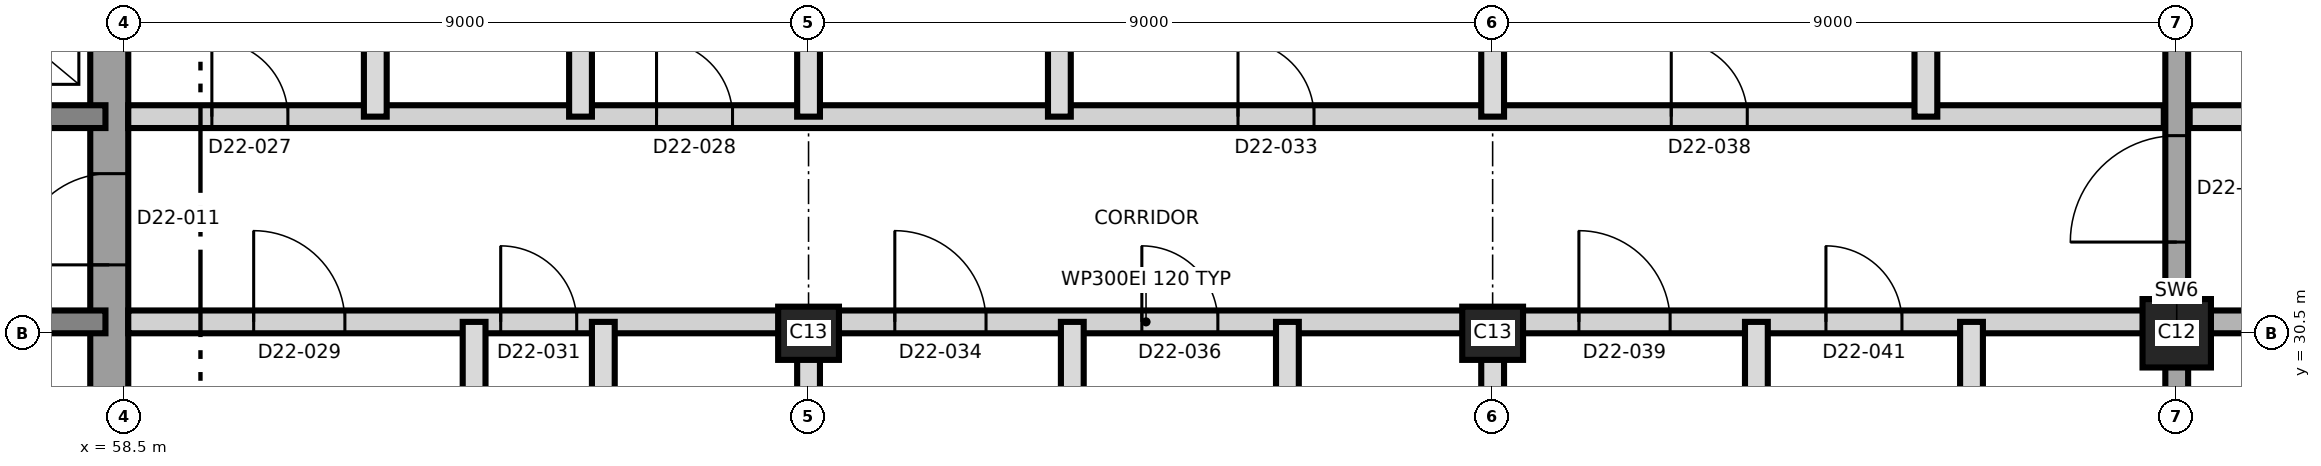
"""IFC4 building model, lengths in metres.
Left out: names, types, materials, properties, quantities, classifications, styles, units other than length and angle.
Written with IfcOpenShell. Run it as: python <this file> out.ifc"""

import sys

from ifc_helpers import new_model, si_unit, direction, frame, frame_2d, origin, origin_2d, place, context, subcontext, project, spatial, rectangle, extrude, element, fill, save


model = new_model("IFC4")
c1 = context("Model", 3, precision=1e-05, world=origin(), true_north=direction((0.0, 1.0)))
c2 = subcontext(c1, "Body", "Model", "MODEL_VIEW")
j1 = project(units=[si_unit("LENGTHUNIT", "METRE"), si_unit("PLANEANGLEUNIT", "RADIAN")], contexts=[c1])
p1 = place(None, origin())
s1 = spatial("IfcSite", under=j1, at=p1, CompositionType="ELEMENT")
p2 = place(p1, origin())
s2 = spatial("IfcBuilding", under=s1, at=p2, CompositionType="ELEMENT")
p3 = place(p2, frame((0.0, 0.0, 203.2)))
s3 = spatial("IfcBuildingStorey", under=s2, at=p3, CompositionType="ELEMENT", Elevation=203.2)
p4 = place(p3, frame((58.3, 21.25, 0.0), z_axis=(0.0, 0.0, 1.0), x_axis=(0.0, 1.0, 0.0)))
e1 = element("IfcWall", 1, at=p4, inside=s3, PredefinedType="SHEAR", context=c2, shape_type="SweptSolid", body=[
    extrude(rectangle(XDim=18.5, YDim=0.5, at=frame_2d((9.25, 0.0))), origin(), (0.0, 0.0, 1.0), 3.7),
])
p5 = place(p4, frame((10.15, 0.0, 0.0)))
e2 = element("IfcOpeningElement", 2, at=p5, cuts=e1, PredefinedType="OPENING", context=c2, shape_type="SweptSolid", body=[
    extrude(rectangle(XDim=1.2, YDim=2.1, at=frame_2d((0.6, 1.05))), frame((0.0, 0.26, 0.0), z_axis=(0.0, -1.0, 0.0), x_axis=(1.0, 0.0, 0.0)), (0.0, 0.0, 1.0), 0.52),
])
p6 = place(p3, frame((31.75, 30.65, 0.0), z_axis=(0.0, 0.0, 1.0), x_axis=(1.0, 0.0, 0.0)))
e3 = element("IfcWall", 3, at=p6, inside=s3, PredefinedType="SHEAR", context=c2, shape_type="SweptSolid", body=[
    extrude(rectangle(XDim=26.5, YDim=0.3, at=frame_2d((13.25, 0.0))), origin(), (0.0, 0.0, 1.0), 3.7),
])
p7 = place(p6, frame((24.75, 0.0, 0.0)))
e4 = element("IfcOpeningElement", 4, at=p7, cuts=e3, PredefinedType="OPENING", context=c2, shape_type="SweptSolid", body=[
    extrude(rectangle(XDim=1.0, YDim=2.1, at=frame_2d((0.5, 1.05))), frame((0.0, 0.16, 0.0), z_axis=(0.0, -1.0, 0.0), x_axis=(1.0, 0.0, 0.0)), (0.0, 0.0, 1.0), 0.32),
])
p8 = place(p6, frame((4.05, 0.0, 0.0)))
e5 = element("IfcOpeningElement", 5, at=p8, cuts=e3, PredefinedType="OPENING", context=c2, shape_type="SweptSolid", body=[
    extrude(rectangle(XDim=1.0, YDim=2.1, at=frame_2d((0.5, 1.05))), frame((0.0, 0.16, 0.0), z_axis=(0.0, -1.0, 0.0), x_axis=(1.0, 0.0, 0.0)), (0.0, 0.0, 1.0), 0.32),
])
p9 = place(p3, frame((31.75, 33.35, 0.0), z_axis=(0.0, 0.0, 1.0), x_axis=(1.0, 0.0, 0.0)))
e6 = element("IfcWall", 6, at=p9, inside=s3, PredefinedType="SHEAR", context=c2, shape_type="SweptSolid", body=[
    extrude(rectangle(XDim=26.5, YDim=0.3, at=frame_2d((13.25, 0.0))), origin(), (0.0, 0.0, 1.0), 3.7),
])
p10 = place(p9, frame((13.9, 0.0, 0.0)))
e7 = element("IfcOpeningElement", 7, at=p10, cuts=e6, PredefinedType="OPENING", context=c2, shape_type="SweptSolid", body=[
    extrude(rectangle(XDim=1.4, YDim=2.1, at=frame_2d((0.7, 1.05))), frame((0.0, 0.16, 0.0), z_axis=(0.0, -1.0, 0.0), x_axis=(1.0, 0.0, 0.0)), (0.0, 0.0, 1.0), 0.32),
])
p11 = place(p9, frame((5.375, 0.0, 0.0)))
e8 = element("IfcOpeningElement", 8, at=p11, cuts=e6, PredefinedType="OPENING", context=c2, shape_type="SweptSolid", body=[
    extrude(rectangle(XDim=1.2, YDim=2.1, at=frame_2d((0.6, 1.05))), frame((0.0, 0.16, 0.0), z_axis=(0.0, -1.0, 0.0), x_axis=(1.0, 0.0, 0.0)), (0.0, 0.0, 1.0), 0.32),
])
p12 = place(p9, frame((19.925, 0.0, 0.0)))
e9 = element("IfcOpeningElement", 9, at=p12, cuts=e6, PredefinedType="OPENING", context=c2, shape_type="SweptSolid", body=[
    extrude(rectangle(XDim=1.2, YDim=2.1, at=frame_2d((0.6, 1.05))), frame((0.0, 0.16, 0.0), z_axis=(0.0, -1.0, 0.0), x_axis=(1.0, 0.0, 0.0)), (0.0, 0.0, 1.0), 0.32),
])
for number, where, z_axis, x_axis in (
    (10, (67.5, 30.5, 0.0), (0.0, 0.0, 1.0), (1.0, 0.0, 0.0)),
    (11, (76.5, 30.5, 0.0), (0.0, 0.0, 1.0), (1.0, 0.0, 0.0)),
):
    element("IfcColumn", number, at=place(p3, frame(where, z_axis=z_axis, x_axis=x_axis)), inside=s3, PredefinedType="COLUMN", context=c2, shape_type="SweptSolid", body=[
        extrude(rectangle(XDim=0.8, YDim=0.7, at=origin_2d()), origin(), (0.0, 0.0, 1.0), 3.7),
    ])
p13 = place(p3, frame((85.5, 30.5, 0.0), z_axis=(0.0, 0.0, 1.0), x_axis=(1.0, 0.0, 0.0)))
e12 = element("IfcColumn", 12, at=p13, inside=s3, PredefinedType="COLUMN", context=c2, shape_type="SweptSolid", body=[
    extrude(rectangle(XDim=0.9, YDim=0.9, at=origin_2d()), origin(), (0.0, 0.0, 1.0), 3.7),
])
p14 = place(p3, frame((85.5, 20.135, 0.0), z_axis=(0.0, 0.0, 1.0), x_axis=(0.0, 1.0, 0.0)))
e13 = element("IfcWall", 13, at=p14, inside=s3, PredefinedType="SHEAR", context=c2, shape_type="SweptSolid", body=[
    extrude(rectangle(XDim=20.73, YDim=0.3, at=frame_2d((10.365, 0.0))), origin(), (0.0, 0.0, 1.0), 3.7),
])
p15 = place(p14, frame((11.565, 0.0, 0.0)))
e14 = element("IfcOpeningElement", 14, at=p15, cuts=e13, PredefinedType="OPENING", context=c2, shape_type="SweptSolid", body=[
    extrude(rectangle(XDim=1.4, YDim=2.1, at=frame_2d((0.7, 1.05))), frame((0.0, 0.16, 0.0), z_axis=(0.0, -1.0, 0.0), x_axis=(1.0, 0.0, 0.0)), (0.0, 0.0, 1.0), 0.32),
])
p16 = place(p3, frame((58.55, 30.65, 0.0), z_axis=(0.0, 0.0, 1.0), x_axis=(1.0, 0.0, 0.0)))
e15 = element("IfcWall", 15, at=p16, inside=s3, PredefinedType="PARTITIONING", context=c2, shape_type="SweptSolid", body=[
    extrude(rectangle(XDim=26.78, YDim=0.3, at=frame_2d((13.39, 0.0))), origin(), (0.0, 0.0, 1.0), 3.4),
])
p17 = place(p16, frame((1.65, 0.0, 0.0)))
e16 = element("IfcOpeningElement", 16, at=p17, cuts=e15, PredefinedType="OPENING", context=c2, shape_type="SweptSolid", body=[
    extrude(rectangle(XDim=1.2, YDim=2.1, at=frame_2d((0.6, 1.05))), frame((0.0, 0.16, 0.0), z_axis=(0.0, -1.0, 0.0), x_axis=(1.0, 0.0, 0.0)), (0.0, 0.0, 1.0), 0.32),
])
p18 = place(p16, frame((4.9, 0.0, 0.0)))
e17 = element("IfcOpeningElement", 17, at=p18, cuts=e15, PredefinedType="OPENING", context=c2, shape_type="SweptSolid", body=[
    extrude(rectangle(XDim=1.0, YDim=2.1, at=frame_2d((0.5, 1.05))), frame((0.0, 0.16, 0.0), z_axis=(0.0, -1.0, 0.0), x_axis=(1.0, 0.0, 0.0)), (0.0, 0.0, 1.0), 0.32),
])
p19 = place(p16, frame((10.085, 0.0, 0.0)))
e18 = element("IfcOpeningElement", 18, at=p19, cuts=e15, PredefinedType="OPENING", context=c2, shape_type="SweptSolid", body=[
    extrude(rectangle(XDim=1.2, YDim=2.1, at=frame_2d((0.6, 1.05))), frame((0.0, 0.16, 0.0), z_axis=(0.0, -1.0, 0.0), x_axis=(1.0, 0.0, 0.0)), (0.0, 0.0, 1.0), 0.32),
])
p20 = place(p16, frame((13.335, 0.0, 0.0)))
e19 = element("IfcOpeningElement", 19, at=p20, cuts=e15, PredefinedType="OPENING", context=c2, shape_type="SweptSolid", body=[
    extrude(rectangle(XDim=1.0, YDim=2.1, at=frame_2d((0.5, 1.05))), frame((0.0, 0.16, 0.0), z_axis=(0.0, -1.0, 0.0), x_axis=(1.0, 0.0, 0.0)), (0.0, 0.0, 1.0), 0.32),
])
p21 = place(p16, frame((19.085, 0.0, 0.0)))
e20 = element("IfcOpeningElement", 20, at=p21, cuts=e15, PredefinedType="OPENING", context=c2, shape_type="SweptSolid", body=[
    extrude(rectangle(XDim=1.2, YDim=2.1, at=frame_2d((0.6, 1.05))), frame((0.0, 0.16, 0.0), z_axis=(0.0, -1.0, 0.0), x_axis=(1.0, 0.0, 0.0)), (0.0, 0.0, 1.0), 0.32),
])
p22 = place(p16, frame((22.335, 0.0, 0.0)))
e21 = element("IfcOpeningElement", 21, at=p22, cuts=e15, PredefinedType="OPENING", context=c2, shape_type="SweptSolid", body=[
    extrude(rectangle(XDim=1.0, YDim=2.1, at=frame_2d((0.5, 1.05))), frame((0.0, 0.16, 0.0), z_axis=(0.0, -1.0, 0.0), x_axis=(1.0, 0.0, 0.0)), (0.0, 0.0, 1.0), 0.32),
])
p23 = place(p3, frame((85.67, 30.65, 0.0), z_axis=(0.0, 0.0, 1.0), x_axis=(1.0, 0.0, 0.0)))
e22 = element("IfcWall", 22, at=p23, inside=s3, PredefinedType="SHEAR", context=c2, shape_type="SweptSolid", body=[
    extrude(rectangle(XDim=9.58, YDim=0.3, at=frame_2d((4.79, 0.0))), origin(), (0.0, 0.0, 1.0), 3.4),
])
p24 = place(p23, frame((2.08, 0.0, 0.0)))
e23 = element("IfcOpeningElement", 23, at=p24, cuts=e22, PredefinedType="OPENING", context=c2, shape_type="SweptSolid", body=[
    extrude(rectangle(XDim=1.2, YDim=2.1, at=frame_2d((0.6, 1.05))), frame((0.0, 0.16, 0.0), z_axis=(0.0, -1.0, 0.0), x_axis=(1.0, 0.0, 0.0)), (0.0, 0.0, 1.0), 0.32),
])
p25 = place(p23, frame((5.63, 0.0, 0.0)))
e24 = element("IfcOpeningElement", 24, at=p25, cuts=e22, PredefinedType="OPENING", context=c2, shape_type="SweptSolid", body=[
    extrude(rectangle(XDim=1.0, YDim=2.1, at=frame_2d((0.5, 1.05))), frame((0.0, 0.16, 0.0), z_axis=(0.0, -1.0, 0.0), x_axis=(1.0, 0.0, 0.0)), (0.0, 0.0, 1.0), 0.32),
])
p26 = place(p3, frame((58.55, 33.35, 0.0), z_axis=(0.0, 0.0, 1.0), x_axis=(1.0, 0.0, 0.0)))
e25 = element("IfcWall", 25, at=p26, inside=s3, PredefinedType="PARTITIONING", context=c2, shape_type="SweptSolid", body=[
    extrude(rectangle(XDim=26.78, YDim=0.3, at=frame_2d((13.39, 0.0))), origin(), (0.0, 0.0, 1.0), 3.4),
])
p27 = place(p26, frame((1.1, 0.0, 0.0)))
e26 = element("IfcOpeningElement", 26, at=p27, cuts=e25, PredefinedType="OPENING", context=c2, shape_type="SweptSolid", body=[
    extrude(rectangle(XDim=1.0, YDim=2.1, at=frame_2d((0.5, 1.05))), frame((0.0, 0.16, 0.0), z_axis=(0.0, -1.0, 0.0), x_axis=(1.0, 0.0, 0.0)), (0.0, 0.0, 1.0), 0.32),
])
p28 = place(p26, frame((6.95, 0.0, 0.0)))
e27 = element("IfcOpeningElement", 27, at=p28, cuts=e25, PredefinedType="OPENING", context=c2, shape_type="SweptSolid", body=[
    extrude(rectangle(XDim=1.0, YDim=2.1, at=frame_2d((0.5, 1.05))), frame((0.0, 0.16, 0.0), z_axis=(0.0, -1.0, 0.0), x_axis=(1.0, 0.0, 0.0)), (0.0, 0.0, 1.0), 0.32),
])
p29 = place(p26, frame((14.6, 0.0, 0.0)))
e28 = element("IfcOpeningElement", 28, at=p29, cuts=e25, PredefinedType="OPENING", context=c2, shape_type="SweptSolid", body=[
    extrude(rectangle(XDim=1.0, YDim=2.4, at=frame_2d((0.5, 1.2))), frame((0.0, 0.16, 0.0), z_axis=(0.0, -1.0, 0.0), x_axis=(1.0, 0.0, 0.0)), (0.0, 0.0, 1.0), 0.32),
])
p30 = place(p26, frame((20.3, 0.0, 0.0)))
e29 = element("IfcOpeningElement", 29, at=p30, cuts=e25, PredefinedType="OPENING", context=c2, shape_type="SweptSolid", body=[
    extrude(rectangle(XDim=1.0, YDim=2.4, at=frame_2d((0.5, 1.2))), frame((0.0, 0.16, 0.0), z_axis=(0.0, -1.0, 0.0), x_axis=(1.0, 0.0, 0.0)), (0.0, 0.0, 1.0), 0.32),
])
p31 = place(p3, frame((85.67, 33.35, 0.0), z_axis=(0.0, 0.0, 1.0), x_axis=(1.0, 0.0, 0.0)))
e30 = element("IfcWall", 30, at=p31, inside=s3, PredefinedType="PARTITIONING", context=c2, shape_type="SweptSolid", body=[
    extrude(rectangle(XDim=9.58, YDim=0.3, at=frame_2d((4.79, 0.0))), origin(), (0.0, 0.0, 1.0), 3.35),
])
p32 = place(p31, frame((1.83, 0.0, 0.0)))
e31 = element("IfcOpeningElement", 31, at=p32, cuts=e30, PredefinedType="OPENING", context=c2, shape_type="SweptSolid", body=[
    extrude(rectangle(XDim=1.0, YDim=2.1, at=frame_2d((0.5, 1.05))), frame((0.0, 0.16, 0.0), z_axis=(0.0, -1.0, 0.0), x_axis=(1.0, 0.0, 0.0)), (0.0, 0.0, 1.0), 0.32),
])
p33 = place(p31, frame((5.63, 0.0, 0.0)))
e32 = element("IfcOpeningElement", 32, at=p33, cuts=e30, PredefinedType="OPENING", context=c2, shape_type="SweptSolid", body=[
    extrude(rectangle(XDim=1.0, YDim=2.1, at=frame_2d((0.5, 1.05))), frame((0.0, 0.16, 0.0), z_axis=(0.0, -1.0, 0.0), x_axis=(1.0, 0.0, 0.0)), (0.0, 0.0, 1.0), 0.32),
])
p34 = place(p3, frame((61.8, 33.35, 0.0), z_axis=(0.0, 0.0, 1.0), x_axis=(0.0, 1.0, 0.0)))
e33 = element("IfcWall", 33, at=p34, inside=s3, PredefinedType="PARTITIONING", context=c2, shape_type="SweptSolid", body=[
    extrude(rectangle(XDim=3.2, YDim=0.3, at=frame_2d((1.6, 0.0))), origin(), (0.0, 0.0, 1.0), 3.4),
])
p35 = place(p3, frame((63.1, 20.135, 0.0), z_axis=(0.0, 0.0, 1.0), x_axis=(0.0, 1.0, 0.0)))
e34 = element("IfcWall", 34, at=p35, inside=s3, PredefinedType="PARTITIONING", context=c2, shape_type="SweptSolid", body=[
    extrude(rectangle(XDim=10.515, YDim=0.3, at=frame_2d((5.257, 0.0))), origin(), (0.0, 0.0, 1.0), 3.35),
])
p36 = place(p3, frame((64.5, 33.35, 0.0), z_axis=(0.0, 0.0, 1.0), x_axis=(0.0, 1.0, 0.0)))
e35 = element("IfcWall", 35, at=p36, inside=s3, PredefinedType="PARTITIONING", context=c2, shape_type="SweptSolid", body=[
    extrude(rectangle(XDim=7.695, YDim=0.3, at=frame_2d((3.847, 0.0))), origin(), (0.0, 0.0, 1.0), 3.35),
])
p37 = place(p3, frame((64.8, 27.45, 0.0), z_axis=(0.0, 0.0, 1.0), x_axis=(0.0, 1.0, 0.0)))
e36 = element("IfcWall", 36, at=p37, inside=s3, PredefinedType="PARTITIONING", context=c2, shape_type="SweptSolid", body=[
    extrude(rectangle(XDim=3.2, YDim=0.3, at=frame_2d((1.6, 0.0))), origin(), (0.0, 0.0, 1.0), 3.4),
])
p38 = place(p3, frame((67.5, 20.135, 0.0), z_axis=(0.0, 0.0, 1.0), x_axis=(0.0, 1.0, 0.0)))
e37 = element("IfcWall", 37, at=p38, inside=s3, PredefinedType="PARTITIONING", context=c2, shape_type="SweptSolid", body=[
    extrude(rectangle(XDim=10.515, YDim=0.3, at=frame_2d((5.257, 0.0))), origin(), (0.0, 0.0, 1.0), 3.35),
])
p39 = place(p3, frame((67.5, 33.35, 0.0), z_axis=(0.0, 0.0, 1.0), x_axis=(0.0, 1.0, 0.0)))
e38 = element("IfcWall", 38, at=p39, inside=s3, PredefinedType="PARTITIONING", context=c2, shape_type="SweptSolid", body=[
    extrude(rectangle(XDim=7.695, YDim=0.3, at=frame_2d((3.847, 0.0))), origin(), (0.0, 0.0, 1.0), 3.35),
])
p40 = place(p3, frame((70.8, 33.35, 0.0), z_axis=(0.0, 0.0, 1.0), x_axis=(0.0, 1.0, 0.0)))
e39 = element("IfcWall", 39, at=p40, inside=s3, PredefinedType="PARTITIONING", context=c2, shape_type="SweptSolid", body=[
    extrude(rectangle(XDim=3.5, YDim=0.3, at=frame_2d((1.75, 0.0))), origin(), (0.0, 0.0, 1.0), 3.4),
])
p41 = place(p3, frame((70.97, 20.135, 0.0), z_axis=(0.0, 0.0, 1.0), x_axis=(0.0, 1.0, 0.0)))
e40 = element("IfcWall", 40, at=p41, inside=s3, PredefinedType="PARTITIONING", context=c2, shape_type="SweptSolid", body=[
    extrude(rectangle(XDim=10.515, YDim=0.3, at=frame_2d((5.257, 0.0))), origin(), (0.0, 0.0, 1.0), 3.35),
])
p42 = place(p3, frame((73.8, 27.45, 0.0), z_axis=(0.0, 0.0, 1.0), x_axis=(0.0, 1.0, 0.0)))
e41 = element("IfcWall", 41, at=p42, inside=s3, PredefinedType="PARTITIONING", context=c2, shape_type="SweptSolid", body=[
    extrude(rectangle(XDim=3.2, YDim=0.3, at=frame_2d((1.6, 0.0))), origin(), (0.0, 0.0, 1.0), 3.4),
])
p43 = place(p3, frame((76.5, 20.135, 0.0), z_axis=(0.0, 0.0, 1.0), x_axis=(0.0, 1.0, 0.0)))
e42 = element("IfcWall", 42, at=p43, inside=s3, PredefinedType="PARTITIONING", context=c2, shape_type="SweptSolid", body=[
    extrude(rectangle(XDim=10.515, YDim=0.3, at=frame_2d((5.257, 0.0))), origin(), (0.0, 0.0, 1.0), 3.35),
])
p44 = place(p3, frame((76.5, 33.35, 0.0), z_axis=(0.0, 0.0, 1.0), x_axis=(0.0, 1.0, 0.0)))
e43 = element("IfcWall", 43, at=p44, inside=s3, PredefinedType="PARTITIONING", context=c2, shape_type="SweptSolid", body=[
    extrude(rectangle(XDim=7.695, YDim=0.3, at=frame_2d((3.847, 0.0))), origin(), (0.0, 0.0, 1.0), 3.35),
])
p45 = place(p3, frame((79.97, 20.135, 0.0), z_axis=(0.0, 0.0, 1.0), x_axis=(0.0, 1.0, 0.0)))
e44 = element("IfcWall", 44, at=p45, inside=s3, PredefinedType="PARTITIONING", context=c2, shape_type="SweptSolid", body=[
    extrude(rectangle(XDim=10.515, YDim=0.3, at=frame_2d((5.257, 0.0))), origin(), (0.0, 0.0, 1.0), 3.35),
])
p46 = place(p3, frame((82.2, 33.35, 0.0), z_axis=(0.0, 0.0, 1.0), x_axis=(0.0, 1.0, 0.0)))
e45 = element("IfcWall", 45, at=p46, inside=s3, PredefinedType="PARTITIONING", context=c2, shape_type="SweptSolid", body=[
    extrude(rectangle(XDim=3.5, YDim=0.3, at=frame_2d((1.75, 0.0))), origin(), (0.0, 0.0, 1.0), 3.4),
])
p47 = place(p3, frame((82.8, 27.45, 0.0), z_axis=(0.0, 0.0, 1.0), x_axis=(0.0, 1.0, 0.0)))
e46 = element("IfcWall", 46, at=p47, inside=s3, PredefinedType="PARTITIONING", context=c2, shape_type="SweptSolid", body=[
    extrude(rectangle(XDim=3.2, YDim=0.3, at=frame_2d((1.6, 0.0))), origin(), (0.0, 0.0, 1.0), 3.4),
])
p48 = place(p5, origin())
e47 = element("IfcDoor", 47, at=p48, inside=s3, OperationType="SINGLE_SWING_LEFT", PredefinedType="DOOR", context=c2, shape_type="SweptSolid", body=[
    extrude(rectangle(XDim=1.2, YDim=2.1, at=frame_2d((0.6, 1.05))), frame((0.0, 0.025, 0.0), z_axis=(0.0, -1.0, 0.0), x_axis=(1.0, 0.0, 0.0)), (0.0, 0.0, 1.0), 0.05),
])
fill(e2, e47)
p49 = place(p27, origin())
e48 = element("IfcDoor", 48, at=p49, inside=s3, OperationType="SINGLE_SWING_LEFT", PredefinedType="DOOR", context=c2, shape_type="SweptSolid", body=[
    extrude(rectangle(XDim=1.0, YDim=2.1, at=frame_2d((0.5, 1.05))), frame((0.0, 0.025, 0.0), z_axis=(0.0, -1.0, 0.0), x_axis=(1.0, 0.0, 0.0)), (0.0, 0.0, 1.0), 0.05),
])
fill(e26, e48)
p50 = place(p28, origin())
e49 = element("IfcDoor", 49, at=p50, inside=s3, OperationType="SINGLE_SWING_RIGHT", PredefinedType="DOOR", context=c2, shape_type="SweptSolid", body=[
    extrude(rectangle(XDim=1.0, YDim=2.1, at=frame_2d((0.5, 1.05))), frame((0.0, 0.025, 0.0), z_axis=(0.0, -1.0, 0.0), x_axis=(1.0, 0.0, 0.0)), (0.0, 0.0, 1.0), 0.05),
])
fill(e27, e49)
p51 = place(p17, origin())
e50 = element("IfcDoor", 50, at=p51, inside=s3, OperationType="SINGLE_SWING_LEFT", PredefinedType="DOOR", context=c2, shape_type="SweptSolid", body=[
    extrude(rectangle(XDim=1.2, YDim=2.1, at=frame_2d((0.6, 1.05))), frame((0.0, 0.025, 0.0), z_axis=(0.0, -1.0, 0.0), x_axis=(1.0, 0.0, 0.0)), (0.0, 0.0, 1.0), 0.05),
])
fill(e16, e50)
p52 = place(p18, origin())
e51 = element("IfcDoor", 51, at=p52, inside=s3, OperationType="SINGLE_SWING_LEFT", PredefinedType="DOOR", context=c2, shape_type="SweptSolid", body=[
    extrude(rectangle(XDim=1.0, YDim=2.1, at=frame_2d((0.5, 1.05))), frame((0.0, 0.025, 0.0), z_axis=(0.0, -1.0, 0.0), x_axis=(1.0, 0.0, 0.0)), (0.0, 0.0, 1.0), 0.05),
])
fill(e17, e51)
p53 = place(p29, origin())
e52 = element("IfcDoor", 52, at=p53, inside=s3, OperationType="SINGLE_SWING_LEFT", PredefinedType="DOOR", context=c2, shape_type="SweptSolid", body=[
    extrude(rectangle(XDim=1.0, YDim=2.4, at=frame_2d((0.5, 1.2))), frame((0.0, 0.025, 0.0), z_axis=(0.0, -1.0, 0.0), x_axis=(1.0, 0.0, 0.0)), (0.0, 0.0, 1.0), 0.05),
])
fill(e28, e52)
p54 = place(p19, origin())
e53 = element("IfcDoor", 53, at=p54, inside=s3, OperationType="SINGLE_SWING_RIGHT", PredefinedType="DOOR", context=c2, shape_type="SweptSolid", body=[
    extrude(rectangle(XDim=1.2, YDim=2.1, at=frame_2d((0.6, 1.05))), frame((0.0, 0.025, 0.0), z_axis=(0.0, -1.0, 0.0), x_axis=(1.0, 0.0, 0.0)), (0.0, 0.0, 1.0), 0.05),
])
fill(e18, e53)
p55 = place(p20, origin())
e54 = element("IfcDoor", 54, at=p55, inside=s3, OperationType="SINGLE_SWING_LEFT", PredefinedType="DOOR", context=c2, shape_type="SweptSolid", body=[
    extrude(rectangle(XDim=1.0, YDim=2.1, at=frame_2d((0.5, 1.05))), frame((0.0, 0.025, 0.0), z_axis=(0.0, -1.0, 0.0), x_axis=(1.0, 0.0, 0.0)), (0.0, 0.0, 1.0), 0.05),
])
fill(e19, e54)
p56 = place(p30, origin())
e55 = element("IfcDoor", 55, at=p56, inside=s3, OperationType="SINGLE_SWING_RIGHT", PredefinedType="DOOR", context=c2, shape_type="SweptSolid", body=[
    extrude(rectangle(XDim=1.0, YDim=2.4, at=frame_2d((0.5, 1.2))), frame((0.0, 0.025, 0.0), z_axis=(0.0, -1.0, 0.0), x_axis=(1.0, 0.0, 0.0)), (0.0, 0.0, 1.0), 0.05),
])
fill(e29, e55)
p57 = place(p21, origin())
e56 = element("IfcDoor", 56, at=p57, inside=s3, OperationType="SINGLE_SWING_LEFT", PredefinedType="DOOR", context=c2, shape_type="SweptSolid", body=[
    extrude(rectangle(XDim=1.2, YDim=2.1, at=frame_2d((0.6, 1.05))), frame((0.0, 0.025, 0.0), z_axis=(0.0, -1.0, 0.0), x_axis=(1.0, 0.0, 0.0)), (0.0, 0.0, 1.0), 0.05),
])
fill(e20, e56)
p58 = place(p22, origin())
e57 = element("IfcDoor", 57, at=p58, inside=s3, OperationType="SINGLE_SWING_RIGHT", PredefinedType="DOOR", context=c2, shape_type="SweptSolid", body=[
    extrude(rectangle(XDim=1.0, YDim=2.1, at=frame_2d((0.5, 1.05))), frame((0.0, 0.025, 0.0), z_axis=(0.0, -1.0, 0.0), x_axis=(1.0, 0.0, 0.0)), (0.0, 0.0, 1.0), 0.05),
])
fill(e21, e57)
p59 = place(p15, origin())
e58 = element("IfcDoor", 58, at=p59, inside=s3, OperationType="SINGLE_SWING_RIGHT", PredefinedType="DOOR", context=c2, shape_type="SweptSolid", body=[
    extrude(rectangle(XDim=1.4, YDim=2.1, at=frame_2d((0.7, 1.05))), frame((0.0, 0.025, 0.0), z_axis=(0.0, -1.0, 0.0), x_axis=(1.0, 0.0, 0.0)), (0.0, 0.0, 1.0), 0.05),
])
fill(e14, e58)
save(model, sys.argv[1])
